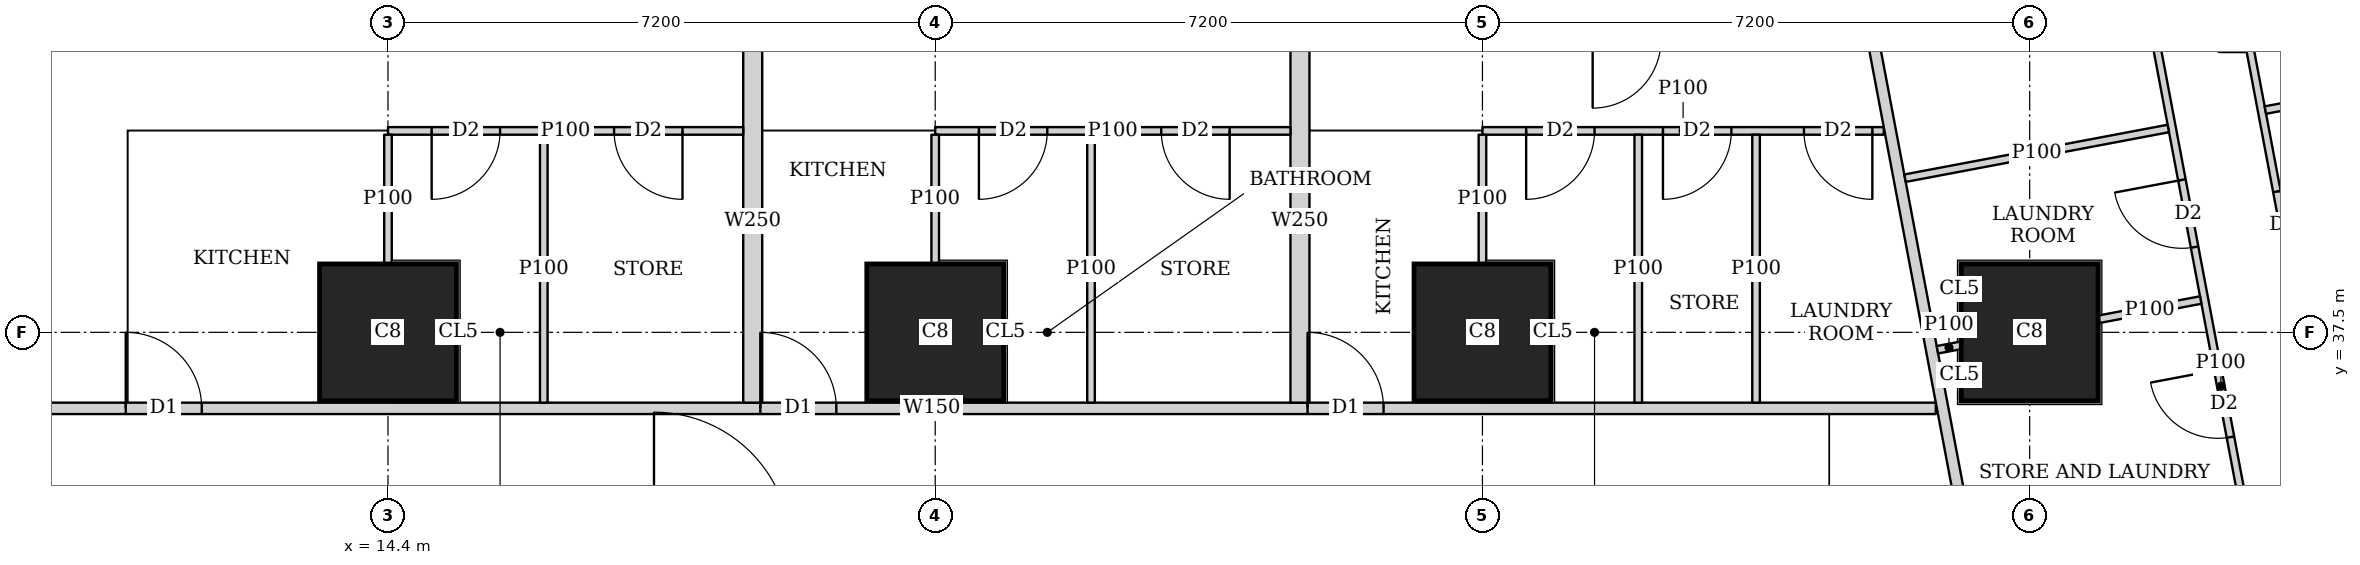
"""IFC4 building model, lengths in metres.
Left out: names, types, materials, properties, quantities, classifications, styles, units other than length and angle.
Written with IfcOpenShell. Run it as: python <this file> out.ifc"""

import sys

from ifc_helpers import new_model, si_unit, direction, frame, frame_2d, origin, origin_2d, place, context, subcontext, project, spatial, rectangle, extrude, element, fill, save


model = new_model("IFC4")
c1 = context("Model", 3, precision=1e-05, world=origin(), true_north=direction((0.0, 1.0)))
c2 = subcontext(c1, "Body", "Model", "MODEL_VIEW")
j1 = project(units=[si_unit("LENGTHUNIT", "METRE"), si_unit("PLANEANGLEUNIT", "RADIAN")], contexts=[c1])
p1 = place(None, origin())
s1 = spatial("IfcSite", under=j1, at=p1, CompositionType="ELEMENT")
p2 = place(p1, origin())
s2 = spatial("IfcBuilding", under=s1, at=p2, CompositionType="ELEMENT")
p3 = place(p2, frame((0.0, 0.0, 65.0)))
s3 = spatial("IfcBuildingStorey", under=s2, at=p3, CompositionType="ELEMENT", Elevation=65.0)
for number, where, z_axis, x_axis in (
    (1, (14.4, 37.5, 0.0), (0.0, 0.0, 1.0), (1.0, 0.0, 0.0)),
    (2, (21.6, 37.5, 0.0), (0.0, 0.0, 1.0), (1.0, 0.0, 0.0)),
    (3, (28.8, 37.5, 0.0), (0.0, 0.0, 1.0), (1.0, 0.0, 0.0)),
    (4, (36.0, 37.5, 0.0), (0.0, 0.0, 1.0), (1.0, 0.0, 0.0)),
):
    element("IfcColumn", number, at=place(p3, frame(where, z_axis=z_axis, x_axis=x_axis)), inside=s3, PredefinedType="COLUMN", context=c2, shape_type="SweptSolid", body=[
        extrude(rectangle(XDim=1.8, YDim=1.8, at=origin_2d()), origin(), (0.0, 0.0, 1.0), 3.75),
    ])
p4 = place(p3, frame((8.35, 36.5, 0.0), z_axis=(0.0, 0.0, 1.0), x_axis=(1.0, 0.0, 0.0)))
e5 = element("IfcWall", 5, at=p4, inside=s3, PredefinedType="SOLIDWALL", context=c2, shape_type="SweptSolid", body=[
    extrude(rectangle(XDim=26.415, YDim=0.15, at=frame_2d((13.208, 0.0))), origin(), (0.0, 0.0, 1.0), 3.5),
])
p5 = place(p4, frame((2.6, 0.0, 0.0)))
e6 = element("IfcOpeningElement", 6, at=p5, cuts=e5, PredefinedType="OPENING", context=c2, shape_type="SweptSolid", body=[
    extrude(rectangle(XDim=1.0, YDim=2.1, at=frame_2d((0.5, 1.05))), frame((0.0, 0.085, 0.0), z_axis=(0.0, -1.0, 0.0), x_axis=(1.0, 0.0, 0.0)), (0.0, 0.0, 1.0), 0.17),
])
p6 = place(p4, frame((10.949, 0.0, 0.0)))
e7 = element("IfcOpeningElement", 7, at=p6, cuts=e5, PredefinedType="OPENING", context=c2, shape_type="SweptSolid", body=[
    extrude(rectangle(XDim=1.0, YDim=2.1, at=frame_2d((0.5, 1.05))), frame((0.0, 0.085, 0.0), z_axis=(0.0, -1.0, 0.0), x_axis=(1.0, 0.0, 0.0)), (0.0, 0.0, 1.0), 0.17),
])
p7 = place(p4, frame((18.149, 0.0, 0.0)))
e8 = element("IfcOpeningElement", 8, at=p7, cuts=e5, PredefinedType="OPENING", context=c2, shape_type="SweptSolid", body=[
    extrude(rectangle(XDim=1.0, YDim=2.1, at=frame_2d((0.5, 1.05))), frame((0.0, 0.085, 0.0), z_axis=(0.0, -1.0, 0.0), x_axis=(1.0, 0.0, 0.0)), (0.0, 0.0, 1.0), 0.17),
])
p8 = place(p3, frame((33.68, 42.723, 0.0), z_axis=(0.0, 0.0, 1.0), x_axis=(0.185624129307, -0.98262082342, 0.0)))
e9 = element("IfcWall", 9, at=p8, inside=s3, PredefinedType="SOLIDWALL", context=c2, shape_type="SweptSolid", body=[
    extrude(rectangle(XDim=41.051, YDim=0.15, at=frame_2d((20.526, 0.0))), origin(), (0.0, 0.0, 1.0), 2.5),
])
p9 = place(p8, frame((13.577, 0.0, 0.0)))
e10 = element("IfcOpeningElement", 10, at=p9, cuts=e9, PredefinedType="OPENING", context=c2, shape_type="SweptSolid", body=[
    extrude(rectangle(XDim=1.0, YDim=2.1, at=frame_2d((0.5, 1.05))), frame((0.0, 0.085, 0.0), z_axis=(0.0, -1.0, 0.0), x_axis=(1.0, 0.0, 0.0)), (0.0, 0.0, 1.0), 0.17),
])
p10 = place(p8, frame((17.394, 0.0, 0.0)))
e11 = element("IfcOpeningElement", 11, at=p10, cuts=e9, PredefinedType="OPENING", context=c2, shape_type="SweptSolid", body=[
    extrude(rectangle(XDim=1.0, YDim=2.1, at=frame_2d((0.5, 1.05))), frame((0.0, 0.085, 0.0), z_axis=(0.0, -1.0, 0.0), x_axis=(1.0, 0.0, 0.0)), (0.0, 0.0, 1.0), 0.17),
])
p11 = place(p8, frame((26.758, 0.0, 0.0)))
e12 = element("IfcOpeningElement", 12, at=p11, cuts=e9, PredefinedType="OPENING", context=c2, shape_type="SweptSolid", body=[
    extrude(rectangle(XDim=1.0, YDim=2.1, at=frame_2d((0.5, 1.05))), frame((0.0, 0.085, 0.0), z_axis=(0.0, -1.0, 0.0), x_axis=(1.0, 0.0, 0.0)), (0.0, 0.0, 1.0), 0.17),
])
p12 = place(p8, frame((32.193, 0.0, 0.0)))
e13 = element("IfcOpeningElement", 13, at=p12, cuts=e9, PredefinedType="OPENING", context=c2, shape_type="SweptSolid", body=[
    extrude(rectangle(XDim=1.0, YDim=2.1, at=frame_2d((0.5, 1.05))), frame((0.0, 0.085, 0.0), z_axis=(0.0, -1.0, 0.0), x_axis=(1.0, 0.0, 0.0)), (0.0, 0.0, 1.0), 0.17),
])
p13 = place(p3, frame((38.9, 41.22, 0.0), z_axis=(0.0, 0.0, 1.0), x_axis=(0.185595712897, -0.982626191059, 0.0)))
e14 = element("IfcWall", 14, at=p13, inside=s3, PredefinedType="PARTITIONING", context=c2, shape_type="SweptSolid", body=[
    extrude(rectangle(XDim=8.524, YDim=0.1, at=frame_2d((4.262, 0.0))), origin(), (0.0, 0.0, 1.0), 3.5),
])
p14 = place(p13, frame((7.352, 0.0, 0.0)))
e15 = element("IfcOpeningElement", 15, at=p14, cuts=e14, PredefinedType="OPENING", context=c2, shape_type="SweptSolid", body=[
    extrude(rectangle(XDim=0.9, YDim=2.1, at=frame_2d((0.45, 1.05))), frame((0.0, 0.06, 0.0), z_axis=(0.0, -1.0, 0.0), x_axis=(1.0, 0.0, 0.0)), (0.0, 0.0, 1.0), 0.12),
])
p15 = place(p13, frame((1.9, 0.0, 0.0)))
e16 = element("IfcOpeningElement", 16, at=p15, cuts=e14, PredefinedType="OPENING", context=c2, shape_type="SweptSolid", body=[
    extrude(rectangle(XDim=0.9, YDim=2.1, at=frame_2d((0.45, 1.05))), frame((0.0, 0.06, 0.0), z_axis=(0.0, -1.0, 0.0), x_axis=(1.0, 0.0, 0.0)), (0.0, 0.0, 1.0), 0.12),
])
p16 = place(p3, frame((37.515, 42.089, 0.0), z_axis=(0.0, 0.0, 1.0), x_axis=(0.185565000991, -0.982631991341, 0.0)))
e17 = element("IfcWall", 17, at=p16, inside=s3, PredefinedType="PARTITIONING", context=c2, shape_type="SweptSolid", body=[
    extrude(rectangle(XDim=10.784, YDim=0.1, at=frame_2d((5.392, 0.0))), origin(), (0.0, 0.0, 1.0), 3.5),
])
p17 = place(p16, frame((9.358, 0.0, 0.0)))
e18 = element("IfcOpeningElement", 18, at=p17, cuts=e17, PredefinedType="OPENING", context=c2, shape_type="SweptSolid", body=[
    extrude(rectangle(XDim=0.9, YDim=2.1, at=frame_2d((0.45, 1.05))), frame((0.0, 0.06, 0.0), z_axis=(0.0, -1.0, 0.0), x_axis=(1.0, 0.0, 0.0)), (0.0, 0.0, 1.0), 0.12),
])
p18 = place(p16, frame((5.173, 0.0, 0.0)))
e19 = element("IfcOpeningElement", 19, at=p18, cuts=e17, PredefinedType="OPENING", context=c2, shape_type="SweptSolid", body=[
    extrude(rectangle(XDim=0.9, YDim=2.1, at=frame_2d((0.45, 1.05))), frame((0.0, 0.06, 0.0), z_axis=(0.0, -1.0, 0.0), x_axis=(1.0, 0.0, 0.0)), (0.0, 0.0, 1.0), 0.12),
])
p19 = place(p16, frame((2.629, 0.0, 0.0)))
e20 = element("IfcOpeningElement", 20, at=p19, cuts=e17, PredefinedType="OPENING", context=c2, shape_type="SweptSolid", body=[
    extrude(rectangle(XDim=0.9, YDim=2.1, at=frame_2d((0.45, 1.05))), frame((0.0, 0.06, 0.0), z_axis=(0.0, -1.0, 0.0), x_axis=(1.0, 0.0, 0.0)), (0.0, 0.0, 1.0), 0.12),
])
p20 = place(p16, frame((7.451, 0.0, 0.0)))
e21 = element("IfcOpeningElement", 21, at=p20, cuts=e17, PredefinedType="OPENING", context=c2, shape_type="SweptSolid", body=[
    extrude(rectangle(XDim=0.9, YDim=2.1, at=frame_2d((0.45, 1.05))), frame((0.0, 0.06, 0.0), z_axis=(0.0, -1.0, 0.0), x_axis=(1.0, 0.0, 0.0)), (0.0, 0.0, 1.0), 0.12),
])
p21 = place(p3, frame((43.277, 41.212, 0.0), z_axis=(0.0, 0.0, 1.0), x_axis=(-0.982665405803, -0.185387972203, 0.0)))
e22 = element("IfcWall", 22, at=p21, inside=s3, PredefinedType="PARTITIONING", context=c2, shape_type="SweptSolid", body=[
    extrude(rectangle(XDim=4.25, YDim=0.1, at=frame_2d((2.125, 0.0))), origin(), (0.0, 0.0, 1.0), 2.05),
])
p22 = place(p3, frame((37.824, 40.182, 0.0), z_axis=(0.0, 0.0, 1.0), x_axis=(-0.982648794755, -0.185475998897, 0.0)))
e23 = element("IfcWall", 23, at=p22, inside=s3, PredefinedType="PARTITIONING", context=c2, shape_type="SweptSolid", body=[
    extrude(rectangle(XDim=3.525, YDim=0.1, at=frame_2d((1.763, 0.0))), origin(), (0.0, 0.0, 1.0), 3.5),
])
p23 = place(p3, frame((38.25, 37.925, 0.0), z_axis=(0.0, 0.0, 1.0), x_axis=(-0.982650574676, -0.185466568658, 0.0)))
e24 = element("IfcWall", 24, at=p23, inside=s3, PredefinedType="PARTITIONING", context=c2, shape_type="SweptSolid", body=[
    extrude(rectangle(XDim=1.364, YDim=0.1, at=frame_2d((0.682, 0.0))), origin(), (0.0, 0.0, 1.0), 3.5),
])
p24 = place(p3, frame((35.09, 37.328, 0.0), z_axis=(0.0, 0.0, 1.0), x_axis=(-0.982961380226, -0.183812200315, 0.0)))
e25 = element("IfcWall", 25, at=p24, inside=s3, PredefinedType="PARTITIONING", context=c2, shape_type="SweptSolid", body=[
    extrude(rectangle(XDim=0.31, YDim=0.1, at=frame_2d((0.155, 0.0))), origin(), (0.0, 0.0, 1.0), 3.5),
])
p25 = place(p3, frame((14.4, 40.15, 0.0), z_axis=(0.0, 0.0, 1.0), x_axis=(1.0, 0.0, 0.0)))
e26 = element("IfcWall", 26, at=p25, inside=s3, PredefinedType="PARTITIONING", context=c2, shape_type="SweptSolid", body=[
    extrude(rectangle(XDim=4.674, YDim=0.1, at=frame_2d((2.337, 0.0))), origin(), (0.0, 0.0, 1.0), 3.5),
])
p26 = place(p25, frame((0.575, 0.0, 0.0)))
e27 = element("IfcOpeningElement", 27, at=p26, cuts=e26, PredefinedType="OPENING", context=c2, shape_type="SweptSolid", body=[
    extrude(rectangle(XDim=0.9, YDim=2.1, at=frame_2d((0.45, 1.05))), frame((0.0, 0.06, 0.0), z_axis=(0.0, -1.0, 0.0), x_axis=(1.0, 0.0, 0.0)), (0.0, 0.0, 1.0), 0.12),
])
p27 = place(p25, frame((2.975, 0.0, 0.0)))
e28 = element("IfcOpeningElement", 28, at=p27, cuts=e26, PredefinedType="OPENING", context=c2, shape_type="SweptSolid", body=[
    extrude(rectangle(XDim=0.9, YDim=2.1, at=frame_2d((0.45, 1.05))), frame((0.0, 0.06, 0.0), z_axis=(0.0, -1.0, 0.0), x_axis=(1.0, 0.0, 0.0)), (0.0, 0.0, 1.0), 0.12),
])
p28 = place(p3, frame((14.4, 38.401, 0.0), z_axis=(0.0, 0.0, 1.0), x_axis=(0.0, 1.0, 0.0)))
e29 = element("IfcWall", 29, at=p28, inside=s3, PredefinedType="PARTITIONING", context=c2, shape_type="SweptSolid", body=[
    extrude(rectangle(XDim=1.699, YDim=0.1, at=frame_2d((0.85, 0.0))), origin(), (0.0, 0.0, 1.0), 3.5),
])
p29 = place(p3, frame((16.45, 36.575, 0.0), z_axis=(0.0, 0.0, 1.0), x_axis=(0.0, 1.0, 0.0)))
e30 = element("IfcWall", 30, at=p29, inside=s3, PredefinedType="PARTITIONING", context=c2, shape_type="SweptSolid", body=[
    extrude(rectangle(XDim=3.525, YDim=0.1, at=frame_2d((1.763, 0.0))), origin(), (0.0, 0.0, 1.0), 3.5),
])
p30 = place(p3, frame((21.6, 40.15, 0.0), z_axis=(0.0, 0.0, 1.0), x_axis=(1.0, 0.0, 0.0)))
e31 = element("IfcWall", 31, at=p30, inside=s3, PredefinedType="PARTITIONING", context=c2, shape_type="SweptSolid", body=[
    extrude(rectangle(XDim=4.674, YDim=0.1, at=frame_2d((2.337, 0.0))), origin(), (0.0, 0.0, 1.0), 3.5),
])
p31 = place(p30, frame((0.575, 0.0, 0.0)))
e32 = element("IfcOpeningElement", 32, at=p31, cuts=e31, PredefinedType="OPENING", context=c2, shape_type="SweptSolid", body=[
    extrude(rectangle(XDim=0.9, YDim=2.1, at=frame_2d((0.45, 1.05))), frame((0.0, 0.06, 0.0), z_axis=(0.0, -1.0, 0.0), x_axis=(1.0, 0.0, 0.0)), (0.0, 0.0, 1.0), 0.12),
])
p32 = place(p30, frame((2.974, 0.0, 0.0)))
e33 = element("IfcOpeningElement", 33, at=p32, cuts=e31, PredefinedType="OPENING", context=c2, shape_type="SweptSolid", body=[
    extrude(rectangle(XDim=0.9, YDim=2.1, at=frame_2d((0.45, 1.05))), frame((0.0, 0.06, 0.0), z_axis=(0.0, -1.0, 0.0), x_axis=(1.0, 0.0, 0.0)), (0.0, 0.0, 1.0), 0.12),
])
p33 = place(p3, frame((21.6, 38.401, 0.0), z_axis=(0.0, 0.0, 1.0), x_axis=(0.0, 1.0, 0.0)))
e34 = element("IfcWall", 34, at=p33, inside=s3, PredefinedType="PARTITIONING", context=c2, shape_type="SweptSolid", body=[
    extrude(rectangle(XDim=1.699, YDim=0.1, at=frame_2d((0.85, 0.0))), origin(), (0.0, 0.0, 1.0), 3.5),
])
p34 = place(p3, frame((23.65, 36.575, 0.0), z_axis=(0.0, 0.0, 1.0), x_axis=(0.0, 1.0, 0.0)))
e35 = element("IfcWall", 35, at=p34, inside=s3, PredefinedType="PARTITIONING", context=c2, shape_type="SweptSolid", body=[
    extrude(rectangle(XDim=3.525, YDim=0.1, at=frame_2d((1.763, 0.0))), origin(), (0.0, 0.0, 1.0), 3.5),
])
p35 = place(p3, frame((19.199, 36.575, 0.0), z_axis=(0.0, 0.0, 1.0), x_axis=(0.0, 1.0, 0.0)))
e36 = element("IfcWall", 36, at=p35, inside=s3, PredefinedType="SOLIDWALL", context=c2, shape_type="SweptSolid", body=[
    extrude(rectangle(XDim=4.775, YDim=0.25, at=frame_2d((2.388, 0.0))), origin(), (0.0, 0.0, 1.0), 3.5),
])
p36 = place(p3, frame((28.8, 40.15, 0.0), z_axis=(0.0, 0.0, 1.0), x_axis=(1.0, 0.0, 0.0)))
e37 = element("IfcWall", 37, at=p36, inside=s3, PredefinedType="PARTITIONING", context=c2, shape_type="SweptSolid", body=[
    extrude(rectangle(XDim=5.28, YDim=0.1, at=frame_2d((2.64, 0.0))), origin(), (0.0, 0.0, 1.0), 3.5),
])
p37 = place(p36, frame((0.575, 0.0, 0.0)))
e38 = element("IfcOpeningElement", 38, at=p37, cuts=e37, PredefinedType="OPENING", context=c2, shape_type="SweptSolid", body=[
    extrude(rectangle(XDim=0.9, YDim=2.1, at=frame_2d((0.45, 1.05))), frame((0.0, 0.06, 0.0), z_axis=(0.0, -1.0, 0.0), x_axis=(1.0, 0.0, 0.0)), (0.0, 0.0, 1.0), 0.12),
])
p38 = place(p36, frame((4.23, 0.0, 0.0)))
e39 = element("IfcOpeningElement", 39, at=p38, cuts=e37, PredefinedType="OPENING", context=c2, shape_type="SweptSolid", body=[
    extrude(rectangle(XDim=0.9, YDim=2.1, at=frame_2d((0.45, 1.05))), frame((0.0, 0.06, 0.0), z_axis=(0.0, -1.0, 0.0), x_axis=(1.0, 0.0, 0.0)), (0.0, 0.0, 1.0), 0.12),
])
p39 = place(p36, frame((2.375, 0.0, 0.0)))
e40 = element("IfcOpeningElement", 40, at=p39, cuts=e37, PredefinedType="OPENING", context=c2, shape_type="SweptSolid", body=[
    extrude(rectangle(XDim=0.9, YDim=2.1, at=frame_2d((0.45, 1.05))), frame((0.0, 0.06, 0.0), z_axis=(0.0, -1.0, 0.0), x_axis=(1.0, 0.0, 0.0)), (0.0, 0.0, 1.0), 0.12),
])
p40 = place(p3, frame((28.8, 38.401, 0.0), z_axis=(0.0, 0.0, 1.0), x_axis=(0.0, 1.0, 0.0)))
e41 = element("IfcWall", 41, at=p40, inside=s3, PredefinedType="PARTITIONING", context=c2, shape_type="SweptSolid", body=[
    extrude(rectangle(XDim=1.699, YDim=0.1, at=frame_2d((0.85, 0.0))), origin(), (0.0, 0.0, 1.0), 3.5),
])
for number, where, z_axis, x_axis in (
    (42, (32.4, 36.575, 0.0), (0.0, 0.0, 1.0), (0.0, 1.0, 0.0)),
    (43, (30.85, 36.575, 0.0), (0.0, 0.0, 1.0), (0.0, 1.0, 0.0)),
):
    element("IfcWall", number, at=place(p3, frame(where, z_axis=z_axis, x_axis=x_axis)), inside=s3, PredefinedType="PARTITIONING", context=c2, shape_type="SweptSolid", body=[
        extrude(rectangle(XDim=3.525, YDim=0.1, at=frame_2d((1.763, 0.0))), origin(), (0.0, 0.0, 1.0), 3.5),
    ])
p41 = place(p3, frame((26.399, 36.575, 0.0), z_axis=(0.0, 0.0, 1.0), x_axis=(0.0, 1.0, 0.0)))
e44 = element("IfcWall", 44, at=p41, inside=s3, PredefinedType="SOLIDWALL", context=c2, shape_type="SweptSolid", body=[
    extrude(rectangle(XDim=4.775, YDim=0.25, at=frame_2d((2.388, 0.0))), origin(), (0.0, 0.0, 1.0), 3.5),
])
p42 = place(p15, origin())
e45 = element("IfcDoor", 45, at=p42, inside=s3, OperationType="SINGLE_SWING_LEFT", PredefinedType="DOOR", context=c2, shape_type="SweptSolid", body=[
    extrude(rectangle(XDim=0.9, YDim=2.1, at=frame_2d((0.45, 1.05))), frame((0.0, 0.025, 0.0), z_axis=(0.0, -1.0, 0.0), x_axis=(1.0, 0.0, 0.0)), (0.0, 0.0, 1.0), 0.05),
])
fill(e16, e45)
p43 = place(p18, origin())
e46 = element("IfcDoor", 46, at=p43, inside=s3, OperationType="SINGLE_SWING_RIGHT", PredefinedType="DOOR", context=c2, shape_type="SweptSolid", body=[
    extrude(rectangle(XDim=0.9, YDim=2.1, at=frame_2d((0.45, 1.05))), frame((0.0, 0.025, 0.0), z_axis=(0.0, -1.0, 0.0), x_axis=(1.0, 0.0, 0.0)), (0.0, 0.0, 1.0), 0.05),
])
fill(e19, e46)
p44 = place(p19, origin())
e47 = element("IfcDoor", 47, at=p44, inside=s3, OperationType="SINGLE_SWING_RIGHT", PredefinedType="DOOR", context=c2, shape_type="SweptSolid", body=[
    extrude(rectangle(XDim=0.9, YDim=2.1, at=frame_2d((0.45, 1.05))), frame((0.0, 0.025, 0.0), z_axis=(0.0, -1.0, 0.0), x_axis=(1.0, 0.0, 0.0)), (0.0, 0.0, 1.0), 0.05),
])
fill(e20, e47)
p45 = place(p26, origin())
e48 = element("IfcDoor", 48, at=p45, inside=s3, OperationType="SINGLE_SWING_RIGHT", PredefinedType="DOOR", context=c2, shape_type="SweptSolid", body=[
    extrude(rectangle(XDim=0.9, YDim=2.1, at=frame_2d((0.45, 1.05))), frame((0.0, 0.025, 0.0), z_axis=(0.0, -1.0, 0.0), x_axis=(1.0, 0.0, 0.0)), (0.0, 0.0, 1.0), 0.05),
])
fill(e27, e48)
p46 = place(p27, origin())
e49 = element("IfcDoor", 49, at=p46, inside=s3, OperationType="SINGLE_SWING_LEFT", PredefinedType="DOOR", context=c2, shape_type="SweptSolid", body=[
    extrude(rectangle(XDim=0.9, YDim=2.1, at=frame_2d((0.45, 1.05))), frame((0.0, 0.025, 0.0), z_axis=(0.0, -1.0, 0.0), x_axis=(1.0, 0.0, 0.0)), (0.0, 0.0, 1.0), 0.05),
])
fill(e28, e49)
p47 = place(p5, origin())
e50 = element("IfcDoor", 50, at=p47, inside=s3, OperationType="SINGLE_SWING_LEFT", PredefinedType="DOOR", context=c2, shape_type="SweptSolid", body=[
    extrude(rectangle(XDim=1.0, YDim=2.1, at=frame_2d((0.5, 1.05))), frame((0.0, 0.025, 0.0), z_axis=(0.0, -1.0, 0.0), x_axis=(1.0, 0.0, 0.0)), (0.0, 0.0, 1.0), 0.05),
])
fill(e6, e50)
p48 = place(p31, origin())
e51 = element("IfcDoor", 51, at=p48, inside=s3, OperationType="SINGLE_SWING_RIGHT", PredefinedType="DOOR", context=c2, shape_type="SweptSolid", body=[
    extrude(rectangle(XDim=0.9, YDim=2.1, at=frame_2d((0.45, 1.05))), frame((0.0, 0.025, 0.0), z_axis=(0.0, -1.0, 0.0), x_axis=(1.0, 0.0, 0.0)), (0.0, 0.0, 1.0), 0.05),
])
fill(e32, e51)
p49 = place(p32, origin())
e52 = element("IfcDoor", 52, at=p49, inside=s3, OperationType="SINGLE_SWING_LEFT", PredefinedType="DOOR", context=c2, shape_type="SweptSolid", body=[
    extrude(rectangle(XDim=0.9, YDim=2.1, at=frame_2d((0.45, 1.05))), frame((0.0, 0.025, 0.0), z_axis=(0.0, -1.0, 0.0), x_axis=(1.0, 0.0, 0.0)), (0.0, 0.0, 1.0), 0.05),
])
fill(e33, e52)
p50 = place(p6, origin())
e53 = element("IfcDoor", 53, at=p50, inside=s3, OperationType="SINGLE_SWING_LEFT", PredefinedType="DOOR", context=c2, shape_type="SweptSolid", body=[
    extrude(rectangle(XDim=1.0, YDim=2.1, at=frame_2d((0.5, 1.05))), frame((0.0, 0.025, 0.0), z_axis=(0.0, -1.0, 0.0), x_axis=(1.0, 0.0, 0.0)), (0.0, 0.0, 1.0), 0.05),
])
fill(e7, e53)
p51 = place(p37, origin())
e54 = element("IfcDoor", 54, at=p51, inside=s3, OperationType="SINGLE_SWING_RIGHT", PredefinedType="DOOR", context=c2, shape_type="SweptSolid", body=[
    extrude(rectangle(XDim=0.9, YDim=2.1, at=frame_2d((0.45, 1.05))), frame((0.0, 0.025, 0.0), z_axis=(0.0, -1.0, 0.0), x_axis=(1.0, 0.0, 0.0)), (0.0, 0.0, 1.0), 0.05),
])
fill(e38, e54)
p52 = place(p38, origin())
e55 = element("IfcDoor", 55, at=p52, inside=s3, OperationType="SINGLE_SWING_LEFT", PredefinedType="DOOR", context=c2, shape_type="SweptSolid", body=[
    extrude(rectangle(XDim=0.9, YDim=2.1, at=frame_2d((0.45, 1.05))), frame((0.0, 0.025, 0.0), z_axis=(0.0, -1.0, 0.0), x_axis=(1.0, 0.0, 0.0)), (0.0, 0.0, 1.0), 0.05),
])
fill(e39, e55)
p53 = place(p39, origin())
e56 = element("IfcDoor", 56, at=p53, inside=s3, OperationType="SINGLE_SWING_RIGHT", PredefinedType="DOOR", context=c2, shape_type="SweptSolid", body=[
    extrude(rectangle(XDim=0.9, YDim=2.1, at=frame_2d((0.45, 1.05))), frame((0.0, 0.025, 0.0), z_axis=(0.0, -1.0, 0.0), x_axis=(1.0, 0.0, 0.0)), (0.0, 0.0, 1.0), 0.05),
])
fill(e40, e56)
p54 = place(p7, origin())
e57 = element("IfcDoor", 57, at=p54, inside=s3, OperationType="SINGLE_SWING_LEFT", PredefinedType="DOOR", context=c2, shape_type="SweptSolid", body=[
    extrude(rectangle(XDim=1.0, YDim=2.1, at=frame_2d((0.5, 1.05))), frame((0.0, 0.025, 0.0), z_axis=(0.0, -1.0, 0.0), x_axis=(1.0, 0.0, 0.0)), (0.0, 0.0, 1.0), 0.05),
])
fill(e8, e57)
save(model, sys.argv[1])
